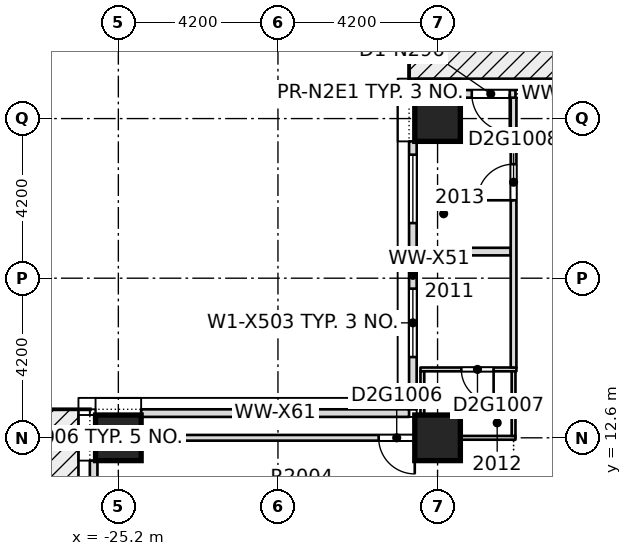
"""IFC4 building model, lengths in metres.
Left out: names, types, materials, properties, quantities, classifications, styles, units other than length and angle.
Written with IfcOpenShell. Run it as: python <this file> out.ifc"""

import sys

from ifc_helpers import new_model, si_unit, direction, frame, frame_2d, origin, origin_2d, place, context, subcontext, project, spatial, rectangle, extrude, element, fill, save


model = new_model("IFC4")
c1 = context("Model", 3, precision=1e-05, world=origin(), true_north=direction((0.0, 1.0)))
c2 = subcontext(c1, "Body", "Model", "MODEL_VIEW")
j1 = project(units=[si_unit("LENGTHUNIT", "METRE"), si_unit("PLANEANGLEUNIT", "RADIAN")], contexts=[c1])
p1 = place(None, origin())
s1 = spatial("IfcSite", under=j1, at=p1, CompositionType="ELEMENT")
p2 = place(p1, origin())
s2 = spatial("IfcBuilding", under=s1, at=p2, CompositionType="ELEMENT")
p3 = place(p2, frame((0.0, 0.0, 83.85)))
s3 = spatial("IfcBuildingStorey", under=s2, at=p3, CompositionType="ELEMENT", Elevation=83.85)
for number, where, z_axis, x_axis in (
    (1, (-25.2, 12.6, -0.32), (0.0, 0.0, 1.0), (1.0, 0.0, 0.0)),
    (2, (-16.8, 12.6, -0.32), (0.0, 0.0, 1.0), (1.0, 0.0, 0.0)),
    (3, (-16.8, 21.0, -0.32), (0.0, 0.0, 1.0), (1.0, 0.0, 0.0)),
):
    element("IfcColumn", number, at=place(p3, frame(where, z_axis=z_axis, x_axis=x_axis)), inside=s3, PredefinedType="COLUMN", context=c2, shape_type="SweptSolid", body=[
        extrude(rectangle(XDim=1.2, YDim=1.2, at=origin_2d()), origin(), (0.0, 0.0, 1.0), 3.45),
    ])
p4 = place(p3, frame((-25.75, 12.6, 0.0), z_axis=(0.0, 0.0, 1.0), x_axis=(1.0, 0.0, 0.0)))
e4 = element("IfcWall", 4, at=p4, inside=s3, PredefinedType="PARTITIONING", context=c2, shape_type="SweptSolid", body=[
    extrude(rectangle(XDim=1.15, YDim=0.15, at=frame_2d((0.575, 0.0))), origin(), (0.0, 0.0, 1.0), 3.13),
])
p5 = place(p3, frame((-17.25, 12.6, 0.0), z_axis=(0.0, 0.0, 1.0), x_axis=(1.0, 0.0, 0.0)))
e5 = element("IfcWall", 5, at=p5, inside=s3, PredefinedType="PARTITIONING", context=c2, shape_type="SweptSolid", body=[
    extrude(rectangle(XDim=2.5, YDim=0.1, at=frame_2d((1.25, 0.0))), origin(), (0.0, 0.0, 1.0), 3.13),
])
p6 = place(p3, frame((-17.25, 14.4, 0.0), z_axis=(0.0, 0.0, 1.0), x_axis=(1.0, 0.0, 0.0)))
e6 = element("IfcWall", 6, at=p6, inside=s3, PredefinedType="PARTITIONING", context=c2, shape_type="SweptSolid", body=[
    extrude(rectangle(XDim=2.525, YDim=0.1, at=frame_2d((1.262, 0.0))), origin(), (0.0, 0.0, 1.0), 3.13),
])
p7 = place(p6, frame((1.075, 0.0, 0.0)))
e7 = element("IfcOpeningElement", 7, at=p7, cuts=e6, PredefinedType="OPENING", context=c2, shape_type="SweptSolid", body=[
    extrude(rectangle(XDim=0.85, YDim=2.1, at=frame_2d((0.425, 1.05))), frame((0.0, 0.06, 0.0), z_axis=(0.0, -1.0, 0.0), x_axis=(1.0, 0.0, 0.0)), (0.0, 0.0, 1.0), 0.12),
])
p8 = place(p3, frame((-17.35, 17.5, 0.0), z_axis=(0.0, 0.0, 1.0), x_axis=(1.0, 0.0, 0.0)))
e8 = element("IfcWall", 8, at=p8, inside=s3, PredefinedType="PARTITIONING", context=c2, shape_type="SweptSolid", body=[
    extrude(rectangle(XDim=2.475, YDim=0.2, at=frame_2d((1.238, 0.0))), origin(), (0.0, 0.0, 1.0), 3.13),
])
p9 = place(p3, frame((-17.2, 12.675, 0.0), z_axis=(0.0, 0.0, 1.0), x_axis=(0.0, 1.0, 0.0)))
e9 = element("IfcWall", 9, at=p9, inside=s3, PredefinedType="PARTITIONING", context=c2, shape_type="SweptSolid", body=[
    extrude(rectangle(XDim=1.675, YDim=0.1, at=frame_2d((0.837, 0.0))), origin(), (0.0, 0.0, 1.0), 3.13),
])
p10 = place(p3, frame((-14.8, 12.65, 0.0), z_axis=(0.0, 0.0, 1.0), x_axis=(0.0, 1.0, 0.0)))
e10 = element("IfcWall", 10, at=p10, inside=s3, PredefinedType="PARTITIONING", context=c2, shape_type="SweptSolid", body=[
    extrude(rectangle(XDim=1.7, YDim=0.1, at=frame_2d((0.85, 0.0))), origin(), (0.0, 0.0, 1.0), 3.13),
])
p11 = place(p3, frame((-14.8, 14.45, 0.0), z_axis=(0.0, 0.0, 1.0), x_axis=(0.0, 1.0, 0.0)))
e11 = element("IfcWall", 11, at=p11, inside=s3, PredefinedType="PARTITIONING", context=c2, shape_type="SweptSolid", body=[
    extrude(rectangle(XDim=7.1, YDim=0.15, at=frame_2d((3.55, 0.0))), origin(), (0.0, 0.0, 1.0), 3.13),
])
p12 = place(p11, frame((4.4, 0.0, 0.0)))
e12 = element("IfcOpeningElement", 12, at=p12, cuts=e11, PredefinedType="OPENING", context=c2, shape_type="SweptSolid", body=[
    extrude(rectangle(XDim=0.95, YDim=2.1, at=frame_2d((0.475, 1.05))), frame((0.0, 0.085, 0.0), z_axis=(0.0, -1.0, 0.0), x_axis=(1.0, 0.0, 0.0)), (0.0, 0.0, 1.0), 0.17),
])
p13 = place(p3, frame((-12.6, 21.65, 0.0), z_axis=(0.0, 0.0, 1.0), x_axis=(-1.0, 0.0, 0.0)))
e13 = element("IfcWall", 13, at=p13, inside=s3, PredefinedType="STANDARD", context=c2, shape_type="SweptSolid", body=[
    extrude(rectangle(XDim=3.6, YDim=0.2, at=frame_2d((1.8, 0.0))), origin(), (0.0, 0.0, 1.0), 3.13),
])
p14 = place(p13, frame((0.35, 0.0, 0.2)))
e14 = element("IfcOpeningElement", 14, at=p14, cuts=e13, PredefinedType="OPENING", context=c2, shape_type="SweptSolid", body=[
    extrude(rectangle(XDim=1.8, YDim=2.65, at=frame_2d((0.9, 1.325))), frame((0.0, 0.11, 0.0), z_axis=(0.0, -1.0, 0.0), x_axis=(1.0, 0.0, 0.0)), (0.0, 0.0, 1.0), 0.22),
])
p15 = place(p13, frame((2.3, 0.0, 0.0)))
e15 = element("IfcOpeningElement", 15, at=p15, cuts=e13, PredefinedType="OPENING", context=c2, shape_type="SweptSolid", body=[
    extrude(rectangle(XDim=1.0, YDim=2.4, at=frame_2d((0.5, 1.2))), frame((0.0, 0.11, 0.0), z_axis=(0.0, -1.0, 0.0), x_axis=(1.0, 0.0, 0.0)), (0.0, 0.0, 1.0), 0.22),
])
p16 = place(p3, frame((-17.45, 20.4, 0.0), z_axis=(0.0, 0.0, 1.0), x_axis=(0.0, -1.0, 0.0)))
e16 = element("IfcWall", 16, at=p16, inside=s3, PredefinedType="STANDARD", context=c2, shape_type="SweptSolid", body=[
    extrude(rectangle(XDim=7.05, YDim=0.2, at=frame_2d((3.525, 0.0))), origin(), (0.0, 0.0, 1.0), 3.13),
])
p17 = place(p16, frame((3.875, 0.0, 0.2)))
e17 = element("IfcOpeningElement", 17, at=p17, cuts=e16, PredefinedType="OPENING", context=c2, shape_type="SweptSolid", body=[
    extrude(rectangle(XDim=1.8, YDim=2.65, at=frame_2d((0.9, 1.325))), frame((0.0, 0.11, 0.0), z_axis=(0.0, -1.0, 0.0), x_axis=(1.0, 0.0, 0.0)), (0.0, 0.0, 1.0), 0.22),
])
p18 = place(p16, frame((0.35, 0.0, 0.2)))
e18 = element("IfcOpeningElement", 18, at=p18, cuts=e16, PredefinedType="OPENING", context=c2, shape_type="SweptSolid", body=[
    extrude(rectangle(XDim=1.8, YDim=2.65, at=frame_2d((0.9, 1.325))), frame((0.0, 0.11, 0.0), z_axis=(0.0, -1.0, 0.0), x_axis=(1.0, 0.0, 0.0)), (0.0, 0.0, 1.0), 0.22),
])
p19 = place(p3, frame((-17.55, 13.25, 0.0), z_axis=(0.0, 0.0, 1.0), x_axis=(-1.0, 0.0, 0.0)))
e19 = element("IfcWall", 19, at=p19, inside=s3, PredefinedType="STANDARD", context=c2, shape_type="SweptSolid", body=[
    extrude(rectangle(XDim=7.05, YDim=0.2, at=frame_2d((3.525, 0.0))), origin(), (0.0, 0.0, 1.0), 3.13),
])
p20 = place(p3, frame((-25.85, 12.0, 0.0), z_axis=(0.0, 0.0, 1.0), x_axis=(0.0, -1.0, 0.0)))
e20 = element("IfcWall", 20, at=p20, inside=s3, PredefinedType="STANDARD", context=c2, shape_type="SweptSolid", body=[
    extrude(rectangle(XDim=7.2, YDim=0.2, at=frame_2d((3.6, 0.0))), origin(), (0.0, 0.0, 1.0), 3.13),
])
p21 = place(p20, frame((3.95, 0.0, 0.2)))
e21 = element("IfcOpeningElement", 21, at=p21, cuts=e20, PredefinedType="OPENING", context=c2, shape_type="SweptSolid", body=[
    extrude(rectangle(XDim=1.8, YDim=2.65, at=frame_2d((0.9, 1.325))), frame((0.0, 0.11, 0.0), z_axis=(0.0, -1.0, 0.0), x_axis=(1.0, 0.0, 0.0)), (0.0, 0.0, 1.0), 0.22),
])
p22 = place(p20, frame((5.85, 0.0, 0.0)))
e22 = element("IfcOpeningElement", 22, at=p22, cuts=e20, PredefinedType="OPENING", context=c2, shape_type="SweptSolid", body=[
    extrude(rectangle(XDim=1.0, YDim=2.4, at=frame_2d((0.5, 1.2))), frame((0.0, 0.11, 0.0), z_axis=(0.0, -1.0, 0.0), x_axis=(1.0, 0.0, 0.0)), (0.0, 0.0, 1.0), 0.22),
])
p23 = place(p20, frame((2.25, 0.0, 0.0)))
e23 = element("IfcOpeningElement", 23, at=p23, cuts=e20, PredefinedType="OPENING", context=c2, shape_type="SweptSolid", body=[
    extrude(rectangle(XDim=1.0, YDim=2.4, at=frame_2d((0.5, 1.2))), frame((0.0, 0.11, 0.0), z_axis=(0.0, -1.0, 0.0), x_axis=(1.0, 0.0, 0.0)), (0.0, 0.0, 1.0), 0.22),
])
p24 = place(p3, frame((-24.6, 12.6, 0.0), z_axis=(0.0, 0.0, 1.0), x_axis=(1.0, 0.0, 0.0)))
e24 = element("IfcWall", 24, at=p24, inside=s3, PredefinedType="PARTITIONING", context=c2, shape_type="SweptSolid", body=[
    extrude(rectangle(XDim=7.2, YDim=0.15, at=frame_2d((3.6, 0.0))), origin(), (0.0, 0.0, 1.0), 2.58),
])
p25 = place(p24, frame((6.25, 0.0, 0.0)))
e25 = element("IfcOpeningElement", 25, at=p25, cuts=e24, PredefinedType="OPENING", context=c2, shape_type="SweptSolid", body=[
    extrude(rectangle(XDim=0.95, YDim=2.1, at=frame_2d((0.475, 1.05))), frame((0.0, 0.085, 0.0), z_axis=(0.0, -1.0, 0.0), x_axis=(1.0, 0.0, 0.0)), (0.0, 0.0, 1.0), 0.17),
])
p26 = place(p3, frame((-17.4, 12.6, 0.0), z_axis=(0.0, 0.0, 1.0), x_axis=(1.0, 0.0, 0.0)))
e26 = element("IfcWall", 26, at=p26, inside=s3, PredefinedType="PARTITIONING", context=c2, shape_type="SweptSolid", body=[
    extrude(rectangle(XDim=0.25, YDim=0.15, at=frame_2d((0.125, 0.0))), origin(), (0.0, 0.0, 1.0), 3.13),
])
p27 = place(p25, origin())
e27 = element("IfcDoor", 27, at=p27, inside=s3, OperationType="SINGLE_SWING_LEFT", PredefinedType="DOOR", context=c2, shape_type="SweptSolid", body=[
    extrude(rectangle(XDim=0.95, YDim=2.1, at=frame_2d((0.475, 1.05))), frame((0.0, 0.025, 0.0), z_axis=(0.0, -1.0, 0.0), x_axis=(1.0, 0.0, 0.0)), (0.0, 0.0, 1.0), 0.05),
])
fill(e25, e27)
p28 = place(p7, origin())
e28 = element("IfcDoor", 28, at=p28, inside=s3, OperationType="SINGLE_SWING_RIGHT", PredefinedType="DOOR", context=c2, shape_type="SweptSolid", body=[
    extrude(rectangle(XDim=0.85, YDim=2.1, at=frame_2d((0.425, 1.05))), frame((0.0, 0.025, 0.0), z_axis=(0.0, -1.0, 0.0), x_axis=(1.0, 0.0, 0.0)), (0.0, 0.0, 1.0), 0.05),
])
fill(e7, e28)
p29 = place(p12, origin())
e29 = element("IfcDoor", 29, at=p29, inside=s3, OperationType="SINGLE_SWING_LEFT", PredefinedType="DOOR", context=c2, shape_type="SweptSolid", body=[
    extrude(rectangle(XDim=0.95, YDim=2.1, at=frame_2d((0.475, 1.05))), frame((0.0, 0.025, 0.0), z_axis=(0.0, -1.0, 0.0), x_axis=(1.0, 0.0, 0.0)), (0.0, 0.0, 1.0), 0.05),
])
fill(e12, e29)
p30 = place(p14, origin())
e30 = element("IfcWindow", 30, at=p30, inside=s3, PartitioningType="SINGLE_PANEL", PredefinedType="WINDOW", context=c2, shape_type="SweptSolid", body=[
    extrude(rectangle(XDim=1.8, YDim=2.65, at=frame_2d((0.9, 1.325))), frame((0.0, 0.03, 0.0), z_axis=(0.0, -1.0, 0.0), x_axis=(1.0, 0.0, 0.0)), (0.0, 0.0, 1.0), 0.06),
])
fill(e14, e30)
p31 = place(p15, origin())
e31 = element("IfcDoor", 31, at=p31, inside=s3, OperationType="SINGLE_SWING_LEFT", PredefinedType="DOOR", context=c2, shape_type="SweptSolid", body=[
    extrude(rectangle(XDim=1.0, YDim=2.4, at=frame_2d((0.5, 1.2))), frame((0.0, 0.025, 0.0), z_axis=(0.0, -1.0, 0.0), x_axis=(1.0, 0.0, 0.0)), (0.0, 0.0, 1.0), 0.05),
])
fill(e15, e31)
p32 = place(p17, origin())
e32 = element("IfcWindow", 32, at=p32, inside=s3, PartitioningType="SINGLE_PANEL", PredefinedType="WINDOW", context=c2, shape_type="SweptSolid", body=[
    extrude(rectangle(XDim=1.8, YDim=2.65, at=frame_2d((0.9, 1.325))), frame((0.0, 0.03, 0.0), z_axis=(0.0, -1.0, 0.0), x_axis=(1.0, 0.0, 0.0)), (0.0, 0.0, 1.0), 0.06),
])
fill(e17, e32)
p33 = place(p18, origin())
e33 = element("IfcWindow", 33, at=p33, inside=s3, PartitioningType="SINGLE_PANEL", PredefinedType="WINDOW", context=c2, shape_type="SweptSolid", body=[
    extrude(rectangle(XDim=1.8, YDim=2.65, at=frame_2d((0.9, 1.325))), frame((0.0, 0.03, 0.0), z_axis=(0.0, -1.0, 0.0), x_axis=(1.0, 0.0, 0.0)), (0.0, 0.0, 1.0), 0.06),
])
fill(e18, e33)
save(model, sys.argv[1])
